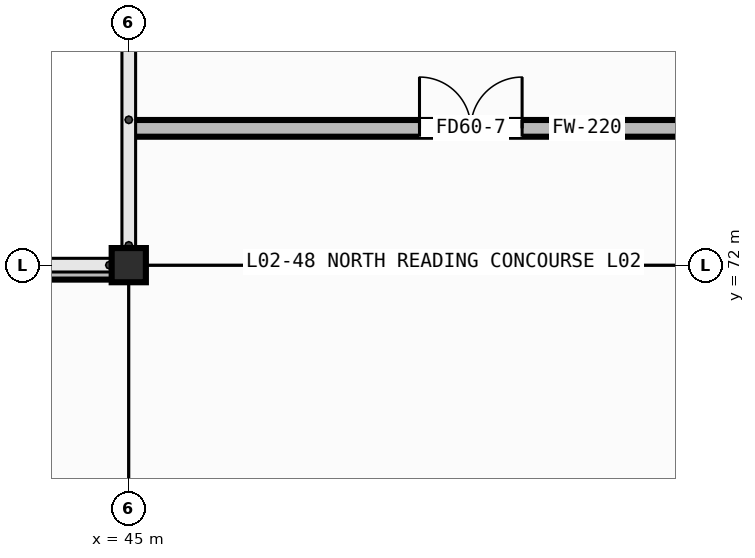
"""IFC4 building model, lengths in metres.
Left out: names, types, materials, properties, quantities, classifications, styles, units other than length and angle.
Written with IfcOpenShell. Run it as: python <this file> out.ifc"""

import sys

from ifc_helpers import new_model, si_unit, direction, frame, frame_2d, origin, origin_2d, place, context, subcontext, project, spatial, rectangle, hollow_rectangle, extrude, element, fill, save


model = new_model("IFC4")
c1 = context("Model", 3, precision=1e-05, world=origin(), true_north=direction((0.0, 1.0)))
c2 = subcontext(c1, "Body", "Model", "MODEL_VIEW")
j1 = project(units=[si_unit("LENGTHUNIT", "METRE"), si_unit("PLANEANGLEUNIT", "RADIAN")], contexts=[c1])
p1 = place(None, origin())
s1 = spatial("IfcSite", under=j1, at=p1, CompositionType="ELEMENT")
p2 = place(p1, origin())
s2 = spatial("IfcBuilding", under=s1, at=p2, CompositionType="ELEMENT")
p3 = place(p2, frame((0.0, 0.0, 4.8)))
s3 = spatial("IfcBuildingStorey", under=s2, at=p3, CompositionType="ELEMENT", Elevation=4.8)
p4 = place(p3, frame((45.0, 72.0, 0.0), z_axis=(0.0, 0.0, 1.0), x_axis=(1.0, 0.0, 0.0)))
e1 = element("IfcColumn", 1, at=p4, inside=s3, PredefinedType="COLUMN", context=c2, shape_type="SweptSolid", body=[
    extrude(hollow_rectangle(XDim=0.45, YDim=0.45, WallThickness=0.019, at=origin_2d()), origin(), (0.0, 0.0, 1.0), 4.0),
])
p5 = place(p3, frame((36.0, 71.905, 4.0), z_axis=(0.0, 0.0, 1.0), x_axis=(1.0, 0.0, 0.0)))
e2 = element("IfcWall", 2, at=p5, inside=s3, PredefinedType="PARAPET", context=c2, shape_type="SweptSolid", body=[
    extrude(rectangle(XDim=9.0, YDim=0.19, at=frame_2d((4.5, 0.0))), origin(), (0.0, 0.0, 1.0), 0.65),
])
p6 = place(p3, frame((45.035, 73.8, 0.0), z_axis=(0.0, 0.0, 1.0), x_axis=(1.0, 0.0, 0.0)))
e3 = element("IfcWall", 3, at=p6, inside=s3, PredefinedType="PARTITIONING", context=c2, shape_type="SweptSolid", body=[
    extrude(rectangle(XDim=9.365, YDim=0.22, at=frame_2d((4.683, 0.0))), origin(), (0.0, 0.0, 1.0), 3.755),
])
p7 = place(p6, frame((3.79, 0.0, 0.0)))
e4 = element("IfcOpeningElement", 4, at=p7, cuts=e3, PredefinedType="OPENING", context=c2, shape_type="SweptSolid", body=[
    extrude(rectangle(XDim=1.35, YDim=2.08, at=frame_2d((0.675, 1.04))), frame((0.0, 0.122, 0.0), z_axis=(0.0, -1.0, 0.0), x_axis=(1.0, 0.0, 0.0)), (0.0, 0.0, 1.0), 0.244),
])
p8 = place(p7, origin())
e5 = element("IfcDoor", 5, at=p8, inside=s3, OperationType="DOUBLE_DOOR_SINGLE_SWING", PredefinedType="DOOR", context=c2, shape_type="SweptSolid", body=[
    extrude(rectangle(XDim=1.35, YDim=2.08, at=frame_2d((0.675, 1.04))), frame((0.0, 0.025, 0.0), z_axis=(0.0, -1.0, 0.0), x_axis=(1.0, 0.0, 0.0)), (0.0, 0.0, 1.0), 0.05),
])
fill(e4, e5)
save(model, sys.argv[1])
